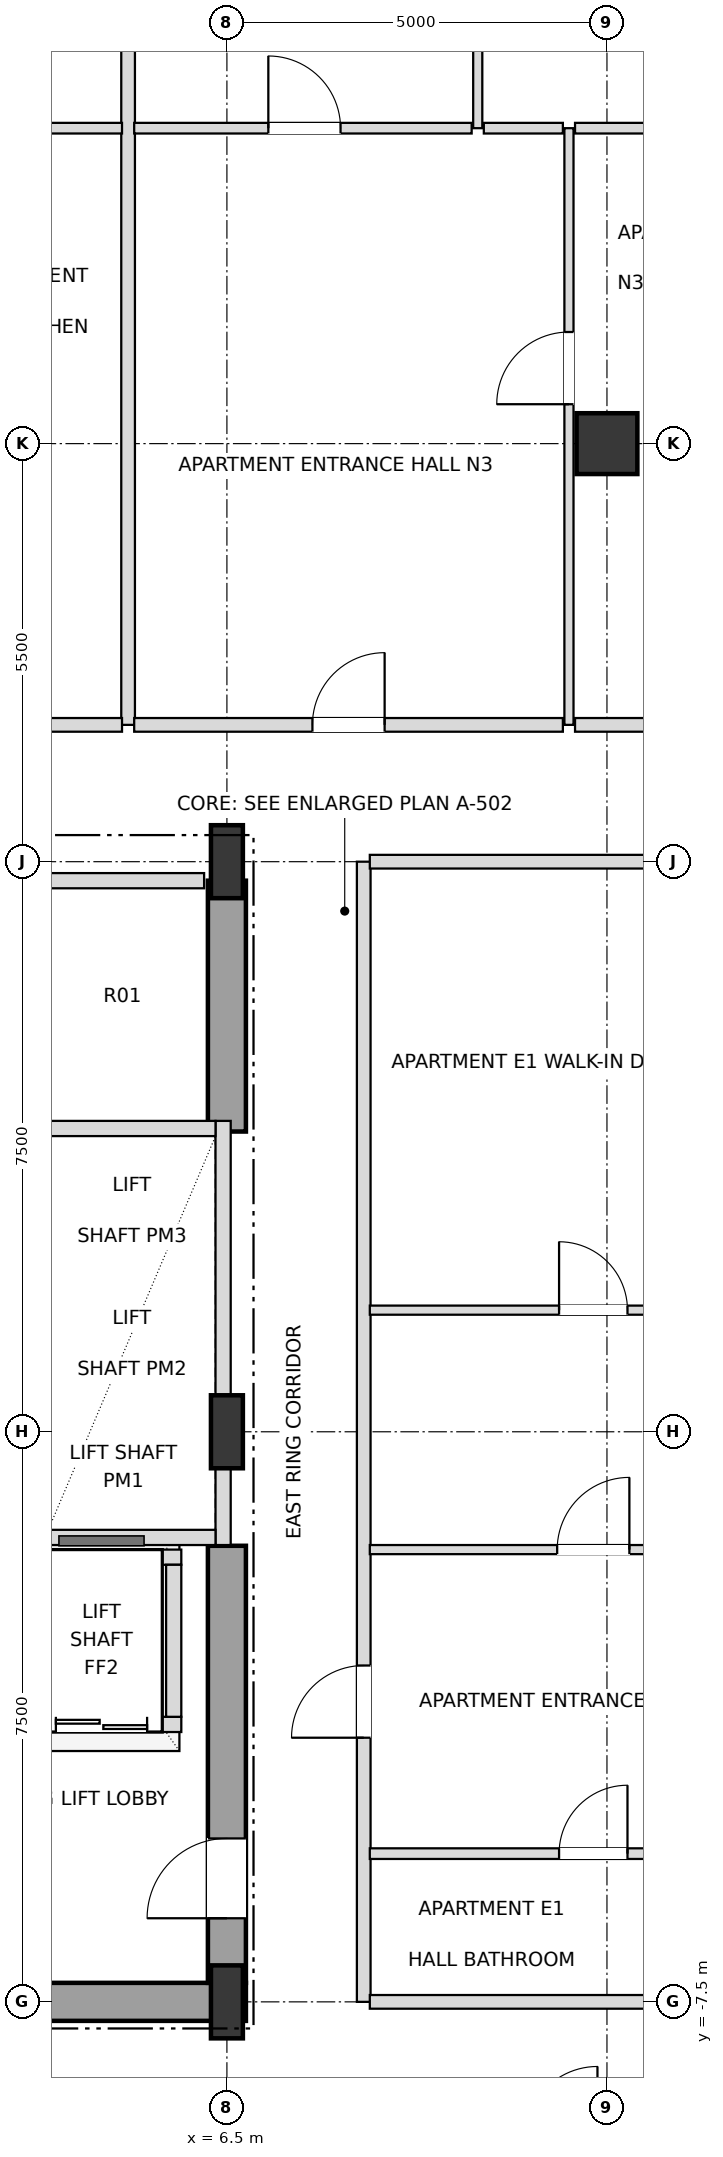
"""IFC4 building model, lengths in metres.
Left out: names, types, materials, properties, quantities, classifications, styles, units other than length and angle.
Written with IfcOpenShell. Run it as: python <this file> out.ifc"""

import sys

from ifc_helpers import new_model, si_unit, direction, frame, frame_2d, origin, origin_2d, place, context, subcontext, project, spatial, rectangle, i_section, extrude, element, fill, save


model = new_model("IFC4")
c1 = context("Model", 3, precision=1e-05, world=origin(), true_north=direction((0.0, 1.0)))
c2 = subcontext(c1, "Body", "Model", "MODEL_VIEW")
j1 = project(units=[si_unit("LENGTHUNIT", "METRE"), si_unit("PLANEANGLEUNIT", "RADIAN")], contexts=[c1])
p1 = place(None, origin())
s1 = spatial("IfcSite", under=j1, at=p1, CompositionType="ELEMENT")
p2 = place(p1, origin())
s2 = spatial("IfcBuilding", under=s1, at=p2, CompositionType="ELEMENT")
p3 = place(p2, frame((0.0, 0.0, 113.4)))
s3 = spatial("IfcBuildingStorey", under=s2, at=p3, CompositionType="ELEMENT", Elevation=113.4)
for number, where, z_axis, x_axis in (
    (1, (6.5, -7.5, 0.0), (0.0, 0.0, 1.0), (1.0, 0.0, 0.0)),
    (2, (6.5, 0.0, 0.0), (0.0, 0.0, 1.0), (1.0, 0.0, 0.0)),
    (3, (6.5, 7.5, 0.0), (0.0, 0.0, 1.0), (1.0, 0.0, 0.0)),
):
    element("IfcColumn", number, at=place(p3, frame(where, z_axis=z_axis, x_axis=x_axis)), inside=s3, PredefinedType="COLUMN", context=c2, shape_type="SweptSolid", body=[
        extrude(i_section(OverallWidth=0.42, OverallDepth=0.96, WebThickness=0.022, FlangeThickness=0.034, at=origin_2d()), origin(), (0.0, 0.0, 1.0), 3.6),
    ])
p4 = place(p3, frame((11.5, 13.0, 0.0), z_axis=(0.0, 0.0, 1.0), x_axis=(1.0, 0.0, 0.0)))
e4 = element("IfcColumn", 4, at=p4, inside=s3, PredefinedType="COLUMN", context=c2, shape_type="SweptSolid", body=[
    extrude(rectangle(XDim=0.8, YDim=0.8, at=origin_2d()), origin(), (0.0, 0.0, 1.0), 3.6),
])
p5 = place(p3, frame((0.0, -7.5, 0.0), z_axis=(0.0, 0.0, 1.0), x_axis=(1.0, 0.0, 0.0)))
e5 = element("IfcWall", 5, at=p5, inside=s3, PredefinedType="SHEAR", context=c2, shape_type="SweptSolid", body=[
    extrude(rectangle(XDim=6.75, YDim=0.5, at=frame_2d((3.375, 0.0))), origin(), (0.0, 0.0, 1.0), 3.38),
])
p6 = place(p3, frame((6.5, -7.25, 0.0), z_axis=(0.0, 0.0, 1.0), x_axis=(0.0, 1.0, 0.0)))
e6 = element("IfcWall", 6, at=p6, inside=s3, PredefinedType="SHEAR", context=c2, shape_type="SweptSolid", body=[
    extrude(rectangle(XDim=5.75, YDim=0.5, at=frame_2d((2.875, 0.0))), origin(), (0.0, 0.0, 1.0), 3.38),
])
p7 = place(p6, frame((0.85, 0.0, 0.0)))
e7 = element("IfcOpeningElement", 7, at=p7, cuts=e6, PredefinedType="OPENING", context=c2, shape_type="SweptSolid", body=[
    extrude(rectangle(XDim=1.05, YDim=2.15, at=frame_2d((0.525, 1.075))), frame((0.0, 0.26, 0.0), z_axis=(0.0, -1.0, 0.0), x_axis=(1.0, 0.0, 0.0)), (0.0, 0.0, 1.0), 0.52),
])
p8 = place(p3, frame((6.5, 3.95, 0.0), z_axis=(0.0, 0.0, 1.0), x_axis=(0.0, 1.0, 0.0)))
e8 = element("IfcWall", 8, at=p8, inside=s3, PredefinedType="SHEAR", context=c2, shape_type="SweptSolid", body=[
    extrude(rectangle(XDim=3.3, YDim=0.5, at=frame_2d((1.65, 0.0))), origin(), (0.0, 0.0, 1.0), 3.38),
])
p9 = place(p3, frame((6.45, -1.49, 0.0), z_axis=(0.0, 0.0, 1.0), x_axis=(0.0, 1.0, 0.0)))
e9 = element("IfcWall", 9, at=p9, inside=s3, PredefinedType="SOLIDWALL", context=c2, shape_type="SweptSolid", body=[
    extrude(rectangle(XDim=5.58, YDim=0.2, at=frame_2d((2.79, 0.0))), origin(), (0.0, 0.0, 1.0), 2.816),
])
for number, where, z_axis, x_axis in (
    (10, (4.15, -1.39, 0.0), (0.0, 0.0, 1.0), (1.0, 0.0, 0.0)),
    (11, (4.15, 3.99, 0.0), (0.0, 0.0, 1.0), (1.0, 0.0, 0.0)),
):
    element("IfcWall", number, at=place(p3, frame(where, z_axis=z_axis, x_axis=x_axis)), inside=s3, PredefinedType="SOLIDWALL", context=c2, shape_type="SweptSolid", body=[
        extrude(rectangle(XDim=2.2, YDim=0.2, at=frame_2d((1.1, 0.0))), origin(), (0.0, 0.0, 1.0), 3.38),
    ])
p10 = place(p3, frame((1.8, -3.85, 0.0), z_axis=(0.0, 0.0, 1.0), x_axis=(1.0, 0.0, 0.0)))
e12 = element("IfcWall", 12, at=p10, inside=s3, PredefinedType="SOLIDWALL", context=c2, shape_type="SweptSolid", body=[
    extrude(rectangle(XDim=4.1, YDim=0.2, at=frame_2d((2.05, 0.0))), origin(), (0.0, 0.0, 1.0), 3.38),
])
p11 = place(p10, frame((0.45, 0.0, 0.0)))
e13 = element("IfcOpeningElement", 13, at=p11, cuts=e12, PredefinedType="OPENING", context=c2, shape_type="SweptSolid", body=[
    extrude(rectangle(XDim=1.2, YDim=2.2, at=frame_2d((0.6, 1.1))), frame((0.0, 0.11, 0.0), z_axis=(0.0, -1.0, 0.0), x_axis=(1.0, 0.0, 0.0)), (0.0, 0.0, 1.0), 0.22),
])
p12 = place(p10, frame((2.45, 0.0, 0.0)))
e14 = element("IfcOpeningElement", 14, at=p12, cuts=e12, PredefinedType="OPENING", context=c2, shape_type="SweptSolid", body=[
    extrude(rectangle(XDim=1.2, YDim=2.2, at=frame_2d((0.6, 1.1))), frame((0.0, 0.11, 0.0), z_axis=(0.0, -1.0, 0.0), x_axis=(1.0, 0.0, 0.0)), (0.0, 0.0, 1.0), 0.22),
])
p13 = place(p3, frame((1.8, -1.65, 0.0), z_axis=(0.0, 0.0, 1.0), x_axis=(1.0, 0.0, 0.0)))
e15 = element("IfcWall", 15, at=p13, inside=s3, PredefinedType="SOLIDWALL", context=c2, shape_type="SweptSolid", body=[
    extrude(rectangle(XDim=4.1, YDim=0.2, at=frame_2d((2.05, 0.0))), origin(), (0.0, 0.0, 1.0), 3.38),
])
p14 = place(p3, frame((5.8, -3.75, 0.0), z_axis=(0.0, 0.0, 1.0), x_axis=(0.0, 1.0, 0.0)))
e16 = element("IfcWall", 16, at=p14, inside=s3, PredefinedType="SOLIDWALL", context=c2, shape_type="SweptSolid", body=[
    extrude(rectangle(XDim=2.0, YDim=0.2, at=frame_2d((1.0, 0.0))), origin(), (0.0, 0.0, 1.0), 3.38),
])
p15 = place(p3, frame((5.2, 9.3, 0.0), z_axis=(0.0, 0.0, 1.0), x_axis=(0.0, 1.0, 0.0)))
e17 = element("IfcWall", 17, at=p15, inside=s3, PredefinedType="PARTITIONING", context=c2, shape_type="SweptSolid", body=[
    extrude(rectangle(XDim=13.85, YDim=0.18, at=frame_2d((6.925, 0.0))), origin(), (0.0, 0.0, 1.0), 2.816),
])
p16 = place(p3, frame((8.3, -7.5, 0.0), z_axis=(0.0, 0.0, 1.0), x_axis=(0.0, 1.0, 0.0)))
e18 = element("IfcWall", 18, at=p16, inside=s3, PredefinedType="PARTITIONING", context=c2, shape_type="SweptSolid", body=[
    extrude(rectangle(XDim=15.0, YDim=0.18, at=frame_2d((7.5, 0.0))), origin(), (0.0, 0.0, 1.0), 3.38),
])
p17 = place(p16, frame((3.475, 0.0, 0.0)))
e19 = element("IfcOpeningElement", 19, at=p17, cuts=e18, PredefinedType="OPENING", context=c2, shape_type="SweptSolid", body=[
    extrude(rectangle(XDim=0.95, YDim=2.15, at=frame_2d((0.475, 1.075))), frame((0.0, 0.1, 0.0), z_axis=(0.0, -1.0, 0.0), x_axis=(1.0, 0.0, 0.0)), (0.0, 0.0, 1.0), 0.2),
])
p18 = place(p3, frame((9.8, 17.15, 0.0), z_axis=(0.0, 0.0, 1.0), x_axis=(0.0, 1.0, 0.0)))
e20 = element("IfcWall", 20, at=p18, inside=s3, PredefinedType="PARTITIONING", context=c2, shape_type="SweptSolid", body=[
    extrude(rectangle(XDim=6.0, YDim=0.12, at=frame_2d((3.0, 0.0))), origin(), (0.0, 0.0, 1.0), 2.816),
])
p19 = place(p18, frame((3.701, 0.0, 0.0)))
e21 = element("IfcOpeningElement", 21, at=p19, cuts=e20, PredefinedType="OPENING", context=c2, shape_type="SweptSolid", body=[
    extrude(rectangle(XDim=0.9, YDim=2.1, at=frame_2d((0.45, 1.05))), frame((0.0, 0.07, 0.0), z_axis=(0.0, -1.0, 0.0), x_axis=(1.0, 0.0, 0.0)), (0.0, 0.0, 1.0), 0.14),
])
p20 = place(p3, frame((11.0, 9.3, 0.0), z_axis=(0.0, 0.0, 1.0), x_axis=(0.0, 1.0, 0.0)))
e22 = element("IfcWall", 22, at=p20, inside=s3, PredefinedType="PARTITIONING", context=c2, shape_type="SweptSolid", body=[
    extrude(rectangle(XDim=7.85, YDim=0.12, at=frame_2d((3.925, 0.0))), origin(), (0.0, 0.0, 1.0), 2.816),
])
p21 = place(p20, frame((4.219, 0.0, 0.0)))
e23 = element("IfcOpeningElement", 23, at=p21, cuts=e22, PredefinedType="OPENING", context=c2, shape_type="SweptSolid", body=[
    extrude(rectangle(XDim=0.95, YDim=2.1, at=frame_2d((0.475, 1.05))), frame((0.0, 0.07, 0.0), z_axis=(0.0, -1.0, 0.0), x_axis=(1.0, 0.0, 0.0)), (0.0, 0.0, 1.0), 0.14),
])
p22 = place(p3, frame((8.38, -7.5, 0.0), z_axis=(0.0, 0.0, 1.0), x_axis=(1.0, 0.0, 0.0)))
e24 = element("IfcWall", 24, at=p22, inside=s3, PredefinedType="PARTITIONING", context=c2, shape_type="SweptSolid", body=[
    extrude(rectangle(XDim=5.89, YDim=0.18, at=frame_2d((2.945, 0.0))), origin(), (0.0, 0.0, 1.0), 2.816),
])
p23 = place(p3, frame((8.38, -5.55, 0.0), z_axis=(0.0, 0.0, 1.0), x_axis=(1.0, 0.0, 0.0)))
e25 = element("IfcWall", 25, at=p23, inside=s3, PredefinedType="PARTITIONING", context=c2, shape_type="SweptSolid", body=[
    extrude(rectangle(XDim=5.89, YDim=0.14, at=frame_2d((2.945, 0.0))), origin(), (0.0, 0.0, 1.0), 3.38),
])
p24 = place(p23, frame((2.49, 0.0, 0.0)))
e26 = element("IfcOpeningElement", 26, at=p24, cuts=e25, PredefinedType="OPENING", context=c2, shape_type="SweptSolid", body=[
    extrude(rectangle(XDim=0.9, YDim=2.1, at=frame_2d((0.45, 1.05))), frame((0.0, 0.08, 0.0), z_axis=(0.0, -1.0, 0.0), x_axis=(1.0, 0.0, 0.0)), (0.0, 0.0, 1.0), 0.16),
])
p25 = place(p3, frame((8.38, -1.55, 0.0), z_axis=(0.0, 0.0, 1.0), x_axis=(1.0, 0.0, 0.0)))
e27 = element("IfcWall", 27, at=p25, inside=s3, PredefinedType="PARTITIONING", context=c2, shape_type="SweptSolid", body=[
    extrude(rectangle(XDim=5.89, YDim=0.12, at=frame_2d((2.945, 0.0))), origin(), (0.0, 0.0, 1.0), 3.38),
])
p26 = place(p25, frame((2.465, 0.0, 0.0)))
e28 = element("IfcOpeningElement", 28, at=p26, cuts=e27, PredefinedType="OPENING", context=c2, shape_type="SweptSolid", body=[
    extrude(rectangle(XDim=0.95, YDim=2.1, at=frame_2d((0.475, 1.05))), frame((0.0, 0.07, 0.0), z_axis=(0.0, -1.0, 0.0), x_axis=(1.0, 0.0, 0.0)), (0.0, 0.0, 1.0), 0.14),
])
p27 = place(p3, frame((8.38, 1.6, 0.0), z_axis=(0.0, 0.0, 1.0), x_axis=(1.0, 0.0, 0.0)))
e29 = element("IfcWall", 29, at=p27, inside=s3, PredefinedType="PARTITIONING", context=c2, shape_type="SweptSolid", body=[
    extrude(rectangle(XDim=5.89, YDim=0.12, at=frame_2d((2.945, 0.0))), origin(), (0.0, 0.0, 1.0), 3.38),
])
p28 = place(p27, frame((2.49, 0.0, 0.0)))
e30 = element("IfcOpeningElement", 30, at=p28, cuts=e29, PredefinedType="OPENING", context=c2, shape_type="SweptSolid", body=[
    extrude(rectangle(XDim=0.9, YDim=2.1, at=frame_2d((0.45, 1.05))), frame((0.0, 0.07, 0.0), z_axis=(0.0, -1.0, 0.0), x_axis=(1.0, 0.0, 0.0)), (0.0, 0.0, 1.0), 0.14),
])
p29 = place(p3, frame((4.13, 7.25, 0.0), z_axis=(0.0, 0.0, 1.0), x_axis=(1.0, 0.0, 0.0)))
e31 = element("IfcWall", 31, at=p29, inside=s3, PredefinedType="SOLIDWALL", context=c2, shape_type="SweptSolid", body=[
    extrude(rectangle(XDim=2.07, YDim=0.2, at=frame_2d((1.035, 0.0))), origin(), (0.0, 0.0, 1.0), 3.38),
])
p30 = place(p3, frame((8.38, 7.5, 0.0), z_axis=(0.0, 0.0, 1.0), x_axis=(1.0, 0.0, 0.0)))
e32 = element("IfcWall", 32, at=p30, inside=s3, PredefinedType="PARTITIONING", context=c2, shape_type="SweptSolid", body=[
    extrude(rectangle(XDim=5.89, YDim=0.18, at=frame_2d((2.945, 0.0))), origin(), (0.0, 0.0, 1.0), 2.816),
])
p31 = place(p3, frame((2.58, 9.3, 0.0), z_axis=(0.0, 0.0, 1.0), x_axis=(1.0, 0.0, 0.0)))
e33 = element("IfcWall", 33, at=p31, inside=s3, PredefinedType="PARTITIONING", context=c2, shape_type="SweptSolid", body=[
    extrude(rectangle(XDim=2.54, YDim=0.18, at=frame_2d((1.27, 0.0))), origin(), (0.0, 0.0, 1.0), 3.38),
])
p32 = place(p3, frame((5.28, 9.3, 0.0), z_axis=(0.0, 0.0, 1.0), x_axis=(1.0, 0.0, 0.0)))
e34 = element("IfcWall", 34, at=p32, inside=s3, PredefinedType="PARTITIONING", context=c2, shape_type="SweptSolid", body=[
    extrude(rectangle(XDim=5.64, YDim=0.18, at=frame_2d((2.82, 0.0))), origin(), (0.0, 0.0, 1.0), 2.816),
])
p33 = place(p32, frame((2.345, 0.0, 0.0)))
e35 = element("IfcOpeningElement", 35, at=p33, cuts=e34, PredefinedType="OPENING", context=c2, shape_type="SweptSolid", body=[
    extrude(rectangle(XDim=0.95, YDim=2.15, at=frame_2d((0.475, 1.075))), frame((0.0, 0.1, 0.0), z_axis=(0.0, -1.0, 0.0), x_axis=(1.0, 0.0, 0.0)), (0.0, 0.0, 1.0), 0.2),
])
p34 = place(p3, frame((11.08, 9.3, 0.0), z_axis=(0.0, 0.0, 1.0), x_axis=(1.0, 0.0, 0.0)))
e36 = element("IfcWall", 36, at=p34, inside=s3, PredefinedType="PARTITIONING", context=c2, shape_type="SweptSolid", body=[
    extrude(rectangle(XDim=2.54, YDim=0.18, at=frame_2d((1.27, 0.0))), origin(), (0.0, 0.0, 1.0), 3.38),
])
p35 = place(p3, frame((2.58, 17.15, 0.0), z_axis=(0.0, 0.0, 1.0), x_axis=(1.0, 0.0, 0.0)))
e37 = element("IfcWall", 37, at=p35, inside=s3, PredefinedType="PARTITIONING", context=c2, shape_type="SweptSolid", body=[
    extrude(rectangle(XDim=2.54, YDim=0.14, at=frame_2d((1.27, 0.0))), origin(), (0.0, 0.0, 1.0), 3.38),
])
p36 = place(p3, frame((5.28, 17.15, 0.0), z_axis=(0.0, 0.0, 1.0), x_axis=(1.0, 0.0, 0.0)))
e38 = element("IfcWall", 38, at=p36, inside=s3, PredefinedType="PARTITIONING", context=c2, shape_type="SweptSolid", body=[
    extrude(rectangle(XDim=4.44, YDim=0.14, at=frame_2d((2.22, 0.0))), origin(), (0.0, 0.0, 1.0), 2.816),
])
p37 = place(p36, frame((1.765, 0.0, 0.0)))
e39 = element("IfcOpeningElement", 39, at=p37, cuts=e38, PredefinedType="OPENING", context=c2, shape_type="SweptSolid", body=[
    extrude(rectangle(XDim=0.95, YDim=2.1, at=frame_2d((0.475, 1.05))), frame((0.0, 0.08, 0.0), z_axis=(0.0, -1.0, 0.0), x_axis=(1.0, 0.0, 0.0)), (0.0, 0.0, 1.0), 0.16),
])
p38 = place(p3, frame((9.88, 17.15, 0.0), z_axis=(0.0, 0.0, 1.0), x_axis=(1.0, 0.0, 0.0)))
e40 = element("IfcWall", 40, at=p38, inside=s3, PredefinedType="PARTITIONING", context=c2, shape_type="SweptSolid", body=[
    extrude(rectangle(XDim=1.04, YDim=0.14, at=frame_2d((0.52, 0.0))), origin(), (0.0, 0.0, 1.0), 3.38),
])
p39 = place(p3, frame((11.08, 17.15, 0.0), z_axis=(0.0, 0.0, 1.0), x_axis=(1.0, 0.0, 0.0)))
e41 = element("IfcWall", 41, at=p39, inside=s3, PredefinedType="PARTITIONING", context=c2, shape_type="SweptSolid", body=[
    extrude(rectangle(XDim=2.54, YDim=0.14, at=frame_2d((1.27, 0.0))), origin(), (0.0, 0.0, 1.0), 2.736),
])
p40 = place(p7, origin())
e42 = element("IfcDoor", 42, at=p40, inside=s3, OperationType="SINGLE_SWING_LEFT", PredefinedType="DOOR", context=c2, shape_type="SweptSolid", body=[
    extrude(rectangle(XDim=1.05, YDim=2.15, at=frame_2d((0.525, 1.075))), frame((0.0, 0.025, 0.0), z_axis=(0.0, -1.0, 0.0), x_axis=(1.0, 0.0, 0.0)), (0.0, 0.0, 1.0), 0.05),
])
fill(e7, e42)
p41 = place(p12, origin())
e43 = element("IfcDoor", 43, at=p41, inside=s3, OperationType="DOUBLE_DOOR_SLIDING", PredefinedType="DOOR", context=c2, shape_type="SweptSolid", body=[
    extrude(rectangle(XDim=1.2, YDim=2.2, at=frame_2d((0.6, 1.1))), frame((0.0, 0.025, 0.0), z_axis=(0.0, -1.0, 0.0), x_axis=(1.0, 0.0, 0.0)), (0.0, 0.0, 1.0), 0.05),
])
fill(e14, e43)
p42 = place(p33, origin())
e44 = element("IfcDoor", 44, at=p42, inside=s3, OperationType="SINGLE_SWING_RIGHT", PredefinedType="DOOR", context=c2, shape_type="SweptSolid", body=[
    extrude(rectangle(XDim=0.95, YDim=2.15, at=frame_2d((0.475, 1.075))), frame((0.0, 0.025, 0.0), z_axis=(0.0, -1.0, 0.0), x_axis=(1.0, 0.0, 0.0)), (0.0, 0.0, 1.0), 0.05),
])
fill(e35, e44)
p43 = place(p21, origin())
e45 = element("IfcDoor", 45, at=p43, inside=s3, OperationType="SINGLE_SWING_LEFT", PredefinedType="DOOR", context=c2, shape_type="SweptSolid", body=[
    extrude(rectangle(XDim=0.95, YDim=2.1, at=frame_2d((0.475, 1.05))), frame((0.0, 0.025, 0.0), z_axis=(0.0, -1.0, 0.0), x_axis=(1.0, 0.0, 0.0)), (0.0, 0.0, 1.0), 0.05),
])
fill(e23, e45)
p44 = place(p37, origin())
e46 = element("IfcDoor", 46, at=p44, inside=s3, OperationType="SINGLE_SWING_LEFT", PredefinedType="DOOR", context=c2, shape_type="SweptSolid", body=[
    extrude(rectangle(XDim=0.95, YDim=2.1, at=frame_2d((0.475, 1.05))), frame((0.0, 0.025, 0.0), z_axis=(0.0, -1.0, 0.0), x_axis=(1.0, 0.0, 0.0)), (0.0, 0.0, 1.0), 0.05),
])
fill(e39, e46)
p45 = place(p24, origin())
e47 = element("IfcDoor", 47, at=p45, inside=s3, OperationType="SINGLE_SWING_RIGHT", PredefinedType="DOOR", context=c2, shape_type="SweptSolid", body=[
    extrude(rectangle(XDim=0.9, YDim=2.1, at=frame_2d((0.45, 1.05))), frame((0.0, 0.025, 0.0), z_axis=(0.0, -1.0, 0.0), x_axis=(1.0, 0.0, 0.0)), (0.0, 0.0, 1.0), 0.05),
])
fill(e26, e47)
p46 = place(p17, origin())
e48 = element("IfcDoor", 48, at=p46, inside=s3, OperationType="SINGLE_SWING_LEFT", PredefinedType="DOOR", context=c2, shape_type="SweptSolid", body=[
    extrude(rectangle(XDim=0.95, YDim=2.15, at=frame_2d((0.475, 1.075))), frame((0.0, 0.025, 0.0), z_axis=(0.0, -1.0, 0.0), x_axis=(1.0, 0.0, 0.0)), (0.0, 0.0, 1.0), 0.05),
])
fill(e19, e48)
p47 = place(p26, origin())
e49 = element("IfcDoor", 49, at=p47, inside=s3, OperationType="SINGLE_SWING_RIGHT", PredefinedType="DOOR", context=c2, shape_type="SweptSolid", body=[
    extrude(rectangle(XDim=0.95, YDim=2.1, at=frame_2d((0.475, 1.05))), frame((0.0, 0.025, 0.0), z_axis=(0.0, -1.0, 0.0), x_axis=(1.0, 0.0, 0.0)), (0.0, 0.0, 1.0), 0.05),
])
fill(e28, e49)
p48 = place(p28, origin())
e50 = element("IfcDoor", 50, at=p48, inside=s3, OperationType="SINGLE_SWING_LEFT", PredefinedType="DOOR", context=c2, shape_type="SweptSolid", body=[
    extrude(rectangle(XDim=0.9, YDim=2.1, at=frame_2d((0.45, 1.05))), frame((0.0, 0.025, 0.0), z_axis=(0.0, -1.0, 0.0), x_axis=(1.0, 0.0, 0.0)), (0.0, 0.0, 1.0), 0.05),
])
fill(e30, e50)
save(model, sys.argv[1])
